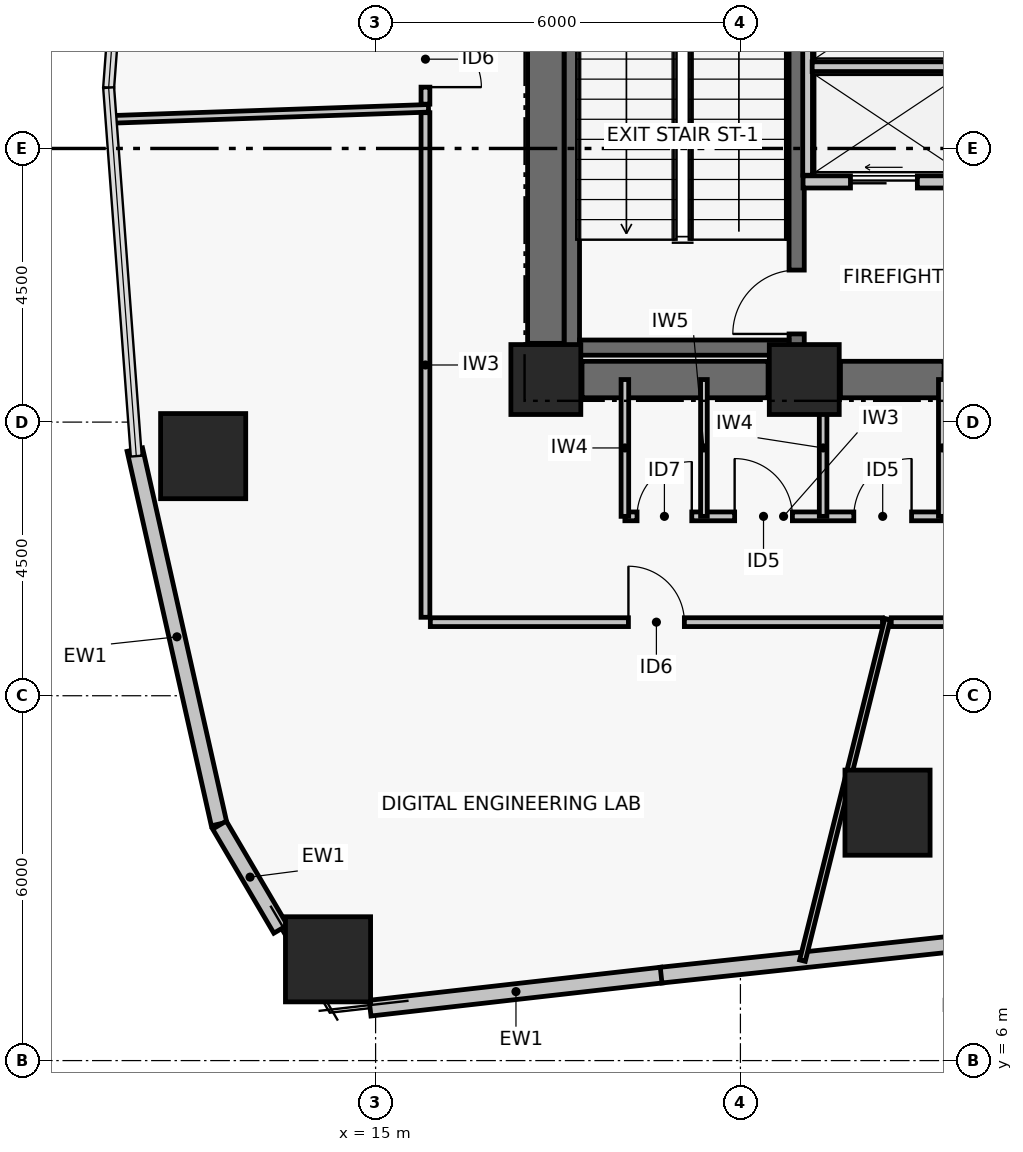
"""IFC4 building model, lengths in metres.
Left out: names, types, materials, properties, quantities, classifications, styles, units other than length and angle.
Written with IfcOpenShell. Run it as: python <this file> out.ifc"""

import sys

from ifc_helpers import new_model, si_unit, direction, frame, frame_2d, origin, origin_2d, place, context, subcontext, project, spatial, rectangle, hollow_rectangle, extrude, element, fill, save


model = new_model("IFC4")
c1 = context("Model", 3, precision=1e-05, world=origin(), true_north=direction((0.0, 1.0)))
c2 = subcontext(c1, "Body", "Model", "MODEL_VIEW")
j1 = project(units=[si_unit("LENGTHUNIT", "METRE"), si_unit("PLANEANGLEUNIT", "RADIAN")], contexts=[c1])
p1 = place(None, origin())
s1 = spatial("IfcSite", under=j1, at=p1, CompositionType="ELEMENT")
p2 = place(p1, origin())
s2 = spatial("IfcBuilding", under=s1, at=p2, CompositionType="ELEMENT")
p3 = place(p2, frame((0.0, 0.0, 61.08)))
s3 = spatial("IfcBuildingStorey", under=s2, at=p3, CompositionType="ELEMENT", Elevation=61.08)
for number, where, z_axis, x_axis in (
    (1, (17.8, 17.2, 0.0), (0.0, 0.0, 1.0), (1.0, 0.0, 0.0)),
    (2, (22.05, 17.2, 0.0), (0.0, 0.0, 1.0), (1.0, 0.0, 0.0)),
):
    element("IfcColumn", number, at=place(p3, frame(where, z_axis=z_axis, x_axis=x_axis)), inside=s3, PredefinedType="COLUMN", context=c2, shape_type="SweptSolid", body=[
        extrude(rectangle(XDim=1.15, YDim=1.15, at=origin_2d()), origin(), (0.0, 0.0, 1.0), 3.72),
    ])
p4 = place(p3, frame((18.395, 17.2, 0.0), z_axis=(0.0, 0.0, 1.0), x_axis=(1.0, 0.0, 0.0)))
e3 = element("IfcWall", 3, at=p4, inside=s3, PredefinedType="SHEAR", context=c2, shape_type="SweptSolid", body=[
    extrude(rectangle(XDim=3.06, YDim=0.6, at=frame_2d((1.53, 0.0))), origin(), (0.0, 0.0, 1.0), 3.47),
])
p5 = place(p3, frame((22.645, 17.2, 0.0), z_axis=(0.0, 0.0, 1.0), x_axis=(1.0, 0.0, 0.0)))
e4 = element("IfcWall", 4, at=p5, inside=s3, PredefinedType="SHEAR", context=c2, shape_type="SweptSolid", body=[
    extrude(rectangle(XDim=1.705, YDim=0.6, at=frame_2d((0.853, 0.0))), origin(), (0.0, 0.0, 1.0), 3.47),
])
p6 = place(p3, frame((17.8, 17.795, 0.0), z_axis=(0.0, 0.0, 1.0), x_axis=(0.0, 1.0, 0.0)))
e5 = element("IfcWall", 5, at=p6, inside=s3, PredefinedType="SHEAR", context=c2, shape_type="SweptSolid", body=[
    extrude(rectangle(XDim=8.41, YDim=0.6, at=frame_2d((4.205, 0.0))), origin(), (0.0, 0.0, 1.0), 3.47),
])
p7 = place(p3, frame((18.229, 17.6, 0.0), z_axis=(0.0, 0.0, 1.0), x_axis=(0.0, 1.0, 0.0)))
e6 = element("IfcWall", 6, at=p7, inside=s3, PredefinedType="SHEAR", context=c2, shape_type="SweptSolid", body=[
    extrude(rectangle(XDim=8.8, YDim=0.25, at=frame_2d((4.4, 0.0))), origin(), (0.0, 0.0, 1.0), 3.47),
])
p8 = place(p3, frame((21.925, 17.6, 0.0), z_axis=(0.0, 0.0, 1.0), x_axis=(0.0, 1.0, 0.0)))
e7 = element("IfcWall", 7, at=p8, inside=s3, PredefinedType="SHEAR", context=c2, shape_type="SweptSolid", body=[
    extrude(rectangle(XDim=8.8, YDim=0.25, at=frame_2d((4.4, 0.0))), origin(), (0.0, 0.0, 1.0), 3.47),
])
p9 = place(p8, frame((0.35, 0.0, 0.0)))
e8 = element("IfcOpeningElement", 8, at=p9, cuts=e7, PredefinedType="OPENING", context=c2, shape_type="SweptSolid", body=[
    extrude(rectangle(XDim=1.05, YDim=2.08, at=frame_2d((0.525, 1.04))), frame((0.0, 0.135, 0.0), z_axis=(0.0, -1.0, 0.0), x_axis=(1.0, 0.0, 0.0)), (0.0, 0.0, 1.0), 0.27),
])
p10 = place(p3, frame((18.354, 17.725, 0.0), z_axis=(0.0, 0.0, 1.0), x_axis=(1.0, 0.0, 0.0)))
e9 = element("IfcWall", 9, at=p10, inside=s3, PredefinedType="SHEAR", context=c2, shape_type="SweptSolid", body=[
    extrude(rectangle(XDim=3.446, YDim=0.25, at=frame_2d((1.723, 0.0))), origin(), (0.0, 0.0, 1.0), 3.47),
])
for number, where, z_axis, x_axis in (
    (10, (12.164, 15.94, 0.0), (0.0, 0.0, 1.0), (1.0, 0.0, 0.0)),
    (11, (14.218, 7.666, 0.0), (0.0, 0.0, 1.0), (1.0, 0.0, 0.0)),
    (12, (23.419, 10.077, 0.0), (0.0, 0.0, 1.0), (1.0, 0.0, 0.0)),
):
    element("IfcColumn", number, at=place(p3, frame(where, z_axis=z_axis, x_axis=x_axis)), inside=s3, PredefinedType="COLUMN", context=c2, shape_type="SweptSolid", body=[
        extrude(hollow_rectangle(XDim=1.4, YDim=1.4, WallThickness=0.055, at=origin_2d()), origin(), (0.0, 0.0, 1.0), 3.72),
    ])
p11 = place(p3, frame((12.426, 9.89, 0.0), z_axis=(0.0, 0.0, 1.0), x_axis=(-0.219505752381, 0.975611205692, 0.0)))
e13 = element("IfcWall", 13, at=p11, inside=s3, PredefinedType="PARTITIONING", context=c2, shape_type="SweptSolid", body=[
    extrude(rectangle(XDim=6.312, YDim=0.26, at=frame_2d((3.156, 0.0))), origin(), (0.0, 0.0, 1.0), 3.47),
])
p12 = place(p3, frame((13.438, 8.161, 0.0), z_axis=(0.0, 0.0, 1.0), x_axis=(-0.506772954594, 0.862079562739, 0.0)))
e14 = element("IfcWall", 14, at=p12, inside=s3, PredefinedType="PARTITIONING", context=c2, shape_type="SweptSolid", body=[
    extrude(rectangle(XDim=1.986, YDim=0.26, at=frame_2d((0.993, 0.0))), origin(), (0.0, 0.0, 1.0), 3.47),
])
p13 = place(p3, frame((19.708, 7.406, 0.0), z_axis=(0.0, 0.0, 1.0), x_axis=(-0.993630237788, -0.112689620435, 0.0)))
e15 = element("IfcWall", 15, at=p13, inside=s3, PredefinedType="PARTITIONING", context=c2, shape_type="SweptSolid", body=[
    extrude(rectangle(XDim=4.829, YDim=0.26, at=frame_2d((2.415, 0.0))), origin(), (0.0, 0.0, 1.0), 3.47),
])
p14 = place(p3, frame((29.398, 8.444, 0.0), z_axis=(0.0, 0.0, 1.0), x_axis=(-0.994319088673, -0.106440358419, 0.0)))
e16 = element("IfcWall", 16, at=p14, inside=s3, PredefinedType="PARTITIONING", context=c2, shape_type="SweptSolid", body=[
    extrude(rectangle(XDim=9.757, YDim=0.26, at=frame_2d((4.879, 0.0))), origin(), (0.0, 0.0, 1.0), 3.47),
])
p15 = place(p3, frame((22.03, 20.45, 0.0), z_axis=(0.0, 0.0, 1.0), x_axis=(1.0, 0.0, 0.0)))
e17 = element("IfcWall", 17, at=p15, inside=s3, PredefinedType="PARTITIONING", context=c2, shape_type="SweptSolid", body=[
    extrude(rectangle(XDim=2.8, YDim=0.2, at=frame_2d((1.4, 0.0))), origin(), (0.0, 0.0, 1.0), 3.47),
])
p16 = place(p15, frame((0.78, 0.0, 0.0)))
e18 = element("IfcOpeningElement", 18, at=p16, cuts=e17, PredefinedType="OPENING", context=c2, shape_type="SweptSolid", body=[
    extrude(rectangle(XDim=1.1, YDim=2.08, at=frame_2d((0.55, 1.04))), frame((0.0, 0.11, 0.0), z_axis=(0.0, -1.0, 0.0), x_axis=(1.0, 0.0, 0.0)), (0.0, 0.0, 1.0), 0.22),
])
p17 = place(p3, frame((22.105, 20.56, 0.0), z_axis=(0.0, 0.0, 1.0), x_axis=(0.0, 1.0, 0.0)))
e19 = element("IfcWall", 19, at=p17, inside=s3, PredefinedType="PARTITIONING", context=c2, shape_type="SweptSolid", body=[
    extrude(rectangle(XDim=5.45, YDim=0.16, at=frame_2d((2.725, 0.0))), origin(), (0.0, 0.0, 1.0), 3.47),
])
p18 = place(p3, frame((22.18, 22.345, 0.0), z_axis=(0.0, 0.0, 1.0), x_axis=(1.0, 0.0, 0.0)))
e20 = element("IfcWall", 20, at=p18, inside=s3, PredefinedType="PARTITIONING", context=c2, shape_type="SweptSolid", body=[
    extrude(rectangle(XDim=2.65, YDim=0.16, at=frame_2d((1.325, 0.0))), origin(), (0.0, 0.0, 1.0), 3.47),
])
p19 = place(p3, frame((19.1, 14.95, 0.0), z_axis=(0.0, 0.0, 1.0), x_axis=(1.0, 0.0, 0.0)))
e21 = element("IfcWall", 21, at=p19, inside=s3, PredefinedType="PARTITIONING", context=c2, shape_type="SweptSolid", body=[
    extrude(rectangle(XDim=5.22, YDim=0.145, at=frame_2d((2.61, 0.0))), origin(), (0.0, 0.0, 1.0), 2.6),
])
p20 = place(p19, frame((0.2, 0.0, 0.0)))
e22 = element("IfcOpeningElement", 22, at=p20, cuts=e21, PredefinedType="OPENING", context=c2, shape_type="SweptSolid", body=[
    extrude(rectangle(XDim=0.9, YDim=2.02, at=frame_2d((0.45, 1.01))), frame((0.0, 0.083, 0.0), z_axis=(0.0, -1.0, 0.0), x_axis=(1.0, 0.0, 0.0)), (0.0, 0.0, 1.0), 0.165),
])
p21 = place(p19, frame((1.805, 0.0, 0.0)))
e23 = element("IfcOpeningElement", 23, at=p21, cuts=e21, PredefinedType="OPENING", context=c2, shape_type="SweptSolid", body=[
    extrude(rectangle(XDim=0.95, YDim=2.06, at=frame_2d((0.475, 1.03))), frame((0.0, 0.083, 0.0), z_axis=(0.0, -1.0, 0.0), x_axis=(1.0, 0.0, 0.0)), (0.0, 0.0, 1.0), 0.165),
])
p22 = place(p19, frame((3.765, 0.0, 0.0)))
e24 = element("IfcOpeningElement", 24, at=p22, cuts=e21, PredefinedType="OPENING", context=c2, shape_type="SweptSolid", body=[
    extrude(rectangle(XDim=0.95, YDim=2.06, at=frame_2d((0.475, 1.03))), frame((0.0, 0.083, 0.0), z_axis=(0.0, -1.0, 0.0), x_axis=(1.0, 0.0, 0.0)), (0.0, 0.0, 1.0), 0.165),
])
p23 = place(p3, frame((19.1, 14.95, 0.0), z_axis=(0.0, 0.0, 1.0), x_axis=(0.0, 1.0, 0.0)))
e25 = element("IfcWall", 25, at=p23, inside=s3, PredefinedType="PARTITIONING", context=c2, shape_type="SweptSolid", body=[
    extrude(rectangle(XDim=2.25, YDim=0.125, at=frame_2d((1.125, 0.0))), origin(), (0.0, 0.0, 1.0), 2.6),
])
p24 = place(p3, frame((20.4, 14.95, 0.0), z_axis=(0.0, 0.0, 1.0), x_axis=(0.0, 1.0, 0.0)))
e26 = element("IfcWall", 26, at=p24, inside=s3, PredefinedType="PARTITIONING", context=c2, shape_type="SweptSolid", body=[
    extrude(rectangle(XDim=2.25, YDim=0.11, at=frame_2d((1.125, 0.0))), origin(), (0.0, 0.0, 1.0), 2.6),
])
for number, where, z_axis, x_axis in (
    (27, (22.36, 14.95, 0.0), (0.0, 0.0, 1.0), (0.0, 1.0, 0.0)),
    (28, (24.32, 14.95, 0.0), (0.0, 0.0, 1.0), (0.0, 1.0, 0.0)),
):
    element("IfcWall", number, at=place(p3, frame(where, z_axis=z_axis, x_axis=x_axis)), inside=s3, PredefinedType="PARTITIONING", context=c2, shape_type="SweptSolid", body=[
        extrude(rectangle(XDim=2.25, YDim=0.125, at=frame_2d((1.125, 0.0))), origin(), (0.0, 0.0, 1.0), 2.6),
    ])
p25 = place(p3, frame((15.82, 21.588, 0.0), z_axis=(0.0, 0.0, 1.0), x_axis=(0.0, -1.0, 0.0)))
e29 = element("IfcWall", 29, at=p25, inside=s3, PredefinedType="PARTITIONING", context=c2, shape_type="SweptSolid", body=[
    extrude(rectangle(XDim=8.298, YDim=0.145, at=frame_2d((4.149, 0.0))), origin(), (0.0, 0.0, 1.0), 2.6),
])
p26 = place(p3, frame((15.9, 13.21, 0.0), z_axis=(0.0, 0.0, 1.0), x_axis=(1.0, 0.0, 0.0)))
e30 = element("IfcWall", 30, at=p26, inside=s3, PredefinedType="PARTITIONING", context=c2, shape_type="SweptSolid", body=[
    extrude(rectangle(XDim=7.436, YDim=0.145, at=frame_2d((3.718, 0.0))), origin(), (0.0, 0.0, 1.0), 2.6),
])
p27 = place(p26, frame((3.258, 0.0, 0.0)))
e31 = element("IfcOpeningElement", 31, at=p27, cuts=e30, PredefinedType="OPENING", context=c2, shape_type="SweptSolid", body=[
    extrude(rectangle(XDim=0.92, YDim=2.05, at=frame_2d((0.46, 1.025))), frame((0.0, 0.083, 0.0), z_axis=(0.0, -1.0, 0.0), x_axis=(1.0, 0.0, 0.0)), (0.0, 0.0, 1.0), 0.165),
])
p28 = place(p3, frame((23.48, 13.21, 0.0), z_axis=(0.0, 0.0, 1.0), x_axis=(1.0, 0.0, 0.0)))
e32 = element("IfcWall", 32, at=p28, inside=s3, PredefinedType="PARTITIONING", context=c2, shape_type="SweptSolid", body=[
    extrude(rectangle(XDim=9.32, YDim=0.145, at=frame_2d((4.66, 0.0))), origin(), (0.0, 0.0, 1.0), 2.85),
])
p29 = place(p28, frame((7.113, 0.0, 0.0)))
e33 = element("IfcOpeningElement", 33, at=p29, cuts=e32, PredefinedType="OPENING", context=c2, shape_type="SweptSolid", body=[
    extrude(rectangle(XDim=0.95, YDim=2.06, at=frame_2d((0.475, 1.03))), frame((0.0, 0.083, 0.0), z_axis=(0.0, -1.0, 0.0), x_axis=(1.0, 0.0, 0.0)), (0.0, 0.0, 1.0), 0.165),
])
p30 = place(p3, frame((15.82, 28.7, 0.0), z_axis=(0.0, 0.0, 1.0), x_axis=(0.0, -1.0, 0.0)))
e34 = element("IfcWall", 34, at=p30, inside=s3, PredefinedType="PARTITIONING", context=c2, shape_type="SweptSolid", body=[
    extrude(rectangle(XDim=6.971, YDim=0.145, at=frame_2d((3.486, 0.0))), origin(), (0.0, 0.0, 1.0), 2.6),
])
p31 = place(p30, frame((5.771, 0.0, 0.0)))
e35 = element("IfcOpeningElement", 35, at=p31, cuts=e34, PredefinedType="OPENING", context=c2, shape_type="SweptSolid", body=[
    extrude(rectangle(XDim=0.92, YDim=2.05, at=frame_2d((0.46, 1.025))), frame((0.0, 0.083, 0.0), z_axis=(0.0, -1.0, 0.0), x_axis=(1.0, 0.0, 0.0)), (0.0, 0.0, 1.0), 0.165),
])
p32 = place(p3, frame((15.87, 21.66, 0.0), z_axis=(0.0, 0.0, 1.0), x_axis=(-0.999391229301, -0.034887974962, 0.0)))
e36 = element("IfcWall", 36, at=p32, inside=s3, PredefinedType="PARTITIONING", context=c2, shape_type="SweptSolid", body=[
    extrude(rectangle(XDim=5.234, YDim=0.125, at=frame_2d((2.617, 0.0))), origin(), (0.0, 0.0, 1.0), 2.85),
])
p33 = place(p3, frame((23.421, 13.26, 0.0), z_axis=(0.0, 0.0, 1.0), x_axis=(-0.241950009825, -0.97028871618, 0.0)))
e37 = element("IfcWall", 37, at=p33, inside=s3, PredefinedType="PARTITIONING", context=c2, shape_type="SweptSolid", body=[
    extrude(rectangle(XDim=5.788, YDim=0.095, at=frame_2d((2.894, 0.0))), origin(), (0.0, 0.0, 1.0), 2.6),
])
p34 = place(p9, origin())
e38 = element("IfcDoor", 38, at=p34, inside=s3, OperationType="SINGLE_SWING_LEFT", PredefinedType="DOOR", context=c2, shape_type="SweptSolid", body=[
    extrude(rectangle(XDim=1.05, YDim=2.08, at=frame_2d((0.525, 1.04))), frame((0.0, 0.025, 0.0), z_axis=(0.0, -1.0, 0.0), x_axis=(1.0, 0.0, 0.0)), (0.0, 0.0, 1.0), 0.05),
])
fill(e8, e38)
p35 = place(p16, origin())
e39 = element("IfcDoor", 39, at=p35, inside=s3, OperationType="DOUBLE_DOOR_SLIDING", PredefinedType="DOOR", context=c2, shape_type="SweptSolid", body=[
    extrude(rectangle(XDim=1.1, YDim=2.08, at=frame_2d((0.55, 1.04))), frame((0.0, 0.025, 0.0), z_axis=(0.0, -1.0, 0.0), x_axis=(1.0, 0.0, 0.0)), (0.0, 0.0, 1.0), 0.05),
])
fill(e18, e39)
p36 = place(p20, origin())
e40 = element("IfcDoor", 40, at=p36, inside=s3, OperationType="SINGLE_SWING_RIGHT", PredefinedType="DOOR", context=c2, shape_type="SweptSolid", body=[
    extrude(rectangle(XDim=0.9, YDim=2.02, at=frame_2d((0.45, 1.01))), frame((0.0, 0.025, 0.0), z_axis=(0.0, -1.0, 0.0), x_axis=(1.0, 0.0, 0.0)), (0.0, 0.0, 1.0), 0.05),
])
fill(e22, e40)
p37 = place(p21, origin())
e41 = element("IfcDoor", 41, at=p37, inside=s3, OperationType="SINGLE_SWING_LEFT", PredefinedType="DOOR", context=c2, shape_type="SweptSolid", body=[
    extrude(rectangle(XDim=0.95, YDim=2.06, at=frame_2d((0.475, 1.03))), frame((0.0, 0.025, 0.0), z_axis=(0.0, -1.0, 0.0), x_axis=(1.0, 0.0, 0.0)), (0.0, 0.0, 1.0), 0.05),
])
fill(e23, e41)
p38 = place(p22, origin())
e42 = element("IfcDoor", 42, at=p38, inside=s3, OperationType="SINGLE_SWING_RIGHT", PredefinedType="DOOR", context=c2, shape_type="SweptSolid", body=[
    extrude(rectangle(XDim=0.95, YDim=2.06, at=frame_2d((0.475, 1.03))), frame((0.0, 0.025, 0.0), z_axis=(0.0, -1.0, 0.0), x_axis=(1.0, 0.0, 0.0)), (0.0, 0.0, 1.0), 0.05),
])
fill(e24, e42)
p39 = place(p27, origin())
e43 = element("IfcDoor", 43, at=p39, inside=s3, OperationType="SINGLE_SWING_LEFT", PredefinedType="DOOR", context=c2, shape_type="SweptSolid", body=[
    extrude(rectangle(XDim=0.92, YDim=2.05, at=frame_2d((0.46, 1.025))), frame((0.0, 0.025, 0.0), z_axis=(0.0, -1.0, 0.0), x_axis=(1.0, 0.0, 0.0)), (0.0, 0.0, 1.0), 0.05),
])
fill(e31, e43)
p40 = place(p31, origin())
e44 = element("IfcDoor", 44, at=p40, inside=s3, OperationType="SINGLE_SWING_RIGHT", PredefinedType="DOOR", context=c2, shape_type="SweptSolid", body=[
    extrude(rectangle(XDim=0.92, YDim=2.05, at=frame_2d((0.46, 1.025))), frame((0.0, 0.025, 0.0), z_axis=(0.0, -1.0, 0.0), x_axis=(1.0, 0.0, 0.0)), (0.0, 0.0, 1.0), 0.05),
])
fill(e35, e44)
save(model, sys.argv[1])
